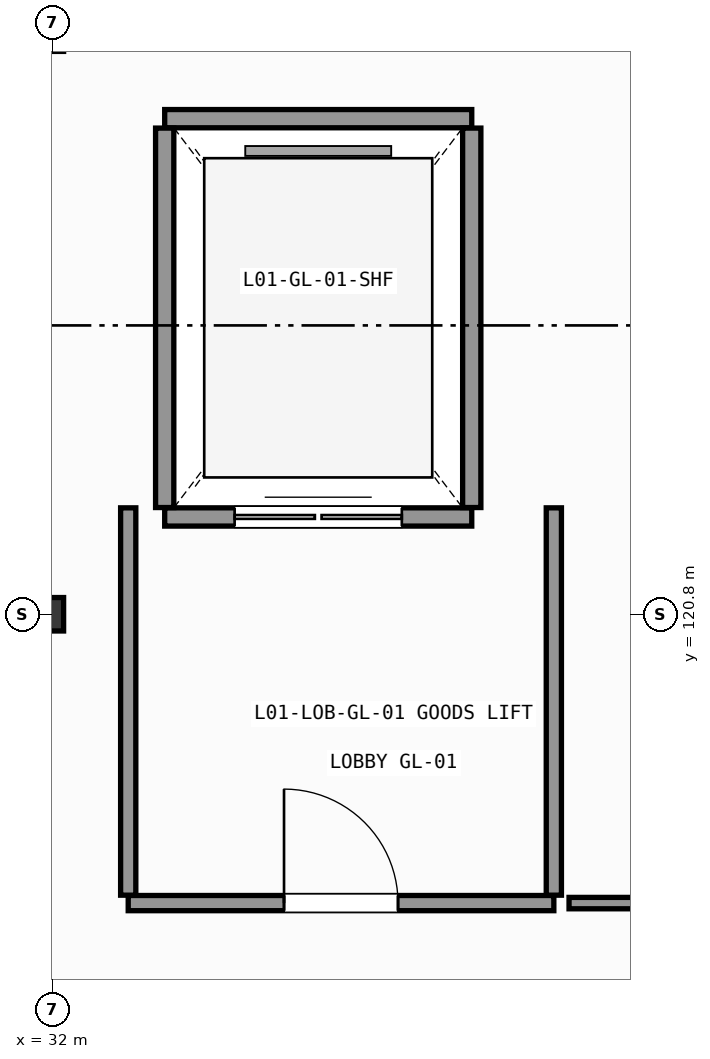
"""IFC4 building model, lengths in metres.
Left out: names, types, materials, properties, quantities, classifications, styles, units other than length and angle.
Written with IfcOpenShell. Run it as: python <this file> out.ifc"""

import sys

from ifc_helpers import new_model, si_unit, direction, frame, frame_2d, origin, origin_2d, place, context, subcontext, project, spatial, rectangle, i_section, extrude, element, fill, save


model = new_model("IFC4")
c1 = context("Model", 3, precision=1e-05, world=origin(), true_north=direction((0.0, 1.0)))
c2 = subcontext(c1, "Body", "Model", "MODEL_VIEW")
j1 = project(units=[si_unit("LENGTHUNIT", "METRE"), si_unit("PLANEANGLEUNIT", "RADIAN")], contexts=[c1])
p1 = place(None, origin())
s1 = spatial("IfcSite", under=j1, at=p1, CompositionType="ELEMENT")
p2 = place(p1, origin())
s2 = spatial("IfcBuilding", under=s1, at=p2, CompositionType="ELEMENT")
p3 = place(p2, origin())
s3 = spatial("IfcBuildingStorey", under=s2, at=p3, CompositionType="ELEMENT", Elevation=0.0)
p4 = place(p3, frame((32.0, 120.8, 0.0), z_axis=(0.0, 0.0, 1.0), x_axis=(1.0, 0.0, 0.0)))
e1 = element("IfcColumn", 1, at=p4, inside=s3, PredefinedType="COLUMN", context=c2, shape_type="SweptSolid", body=[
    extrude(i_section(OverallWidth=0.3, OverallDepth=0.44, WebThickness=0.011, FlangeThickness=0.021, FilletRadius=0.027, at=origin_2d()), origin(), (0.0, 0.0, 1.0), 7.8),
])
p5 = place(p3, frame((33.48, 122.08, 0.0), z_axis=(0.0, 0.0, 1.0), x_axis=(1.0, 0.0, 0.0)))
e2 = element("IfcWall", 2, at=p5, inside=s3, PredefinedType="SHEAR", context=c2, shape_type="SweptSolid", body=[
    extrude(rectangle(XDim=4.04, YDim=0.24, at=frame_2d((2.02, 0.0))), origin(), (0.0, 0.0, 1.0), 7.54),
])
p6 = place(p5, frame((0.92, 0.0, 0.0)))
e3 = element("IfcOpeningElement", 3, at=p6, cuts=e2, PredefinedType="OPENING", context=c2, shape_type="SweptSolid", body=[
    extrude(rectangle(XDim=2.2, YDim=2.6, at=frame_2d((1.1, 1.3))), frame((0.0, 0.13, 0.0), z_axis=(0.0, -1.0, 0.0), x_axis=(1.0, 0.0, 0.0)), (0.0, 0.0, 1.0), 0.26),
])
p7 = place(p3, frame((33.48, 127.32, 0.0), z_axis=(0.0, 0.0, 1.0), x_axis=(1.0, 0.0, 0.0)))
e4 = element("IfcWall", 4, at=p7, inside=s3, PredefinedType="SHEAR", context=c2, shape_type="SweptSolid", body=[
    extrude(rectangle(XDim=4.04, YDim=0.24, at=frame_2d((2.02, 0.0))), origin(), (0.0, 0.0, 1.0), 7.54),
])
for number, where, z_axis, x_axis in (
    (5, (33.48, 122.204, 0.0), (0.0, 0.0, 1.0), (0.0, 1.0, 0.0)),
    (6, (37.52, 122.204, 0.0), (0.0, 0.0, 1.0), (0.0, 1.0, 0.0)),
):
    element("IfcWall", number, at=place(p3, frame(where, z_axis=z_axis, x_axis=x_axis)), inside=s3, PredefinedType="SHEAR", context=c2, shape_type="SweptSolid", body=[
        extrude(rectangle(XDim=4.992, YDim=0.24, at=frame_2d((2.496, 0.0))), origin(), (0.0, 0.0, 1.0), 7.54),
    ])
p8 = place(p3, frame((33.0, 117.0, 0.0), z_axis=(0.0, 0.0, 1.0), x_axis=(1.0, 0.0, 0.0)))
e7 = element("IfcWall", 7, at=p8, inside=s3, PredefinedType="PARTITIONING", context=c2, shape_type="SweptSolid", body=[
    extrude(rectangle(XDim=5.6, YDim=0.2, at=frame_2d((2.8, 0.0))), origin(), (0.0, 0.0, 1.0), 7.54),
])
p9 = place(p8, frame((2.05, 0.0, 0.0)))
e8 = element("IfcOpeningElement", 8, at=p9, cuts=e7, PredefinedType="OPENING", context=c2, shape_type="SweptSolid", body=[
    extrude(rectangle(XDim=1.5, YDim=2.2, at=frame_2d((0.75, 1.1))), frame((0.0, 0.11, 0.0), z_axis=(0.0, -1.0, 0.0), x_axis=(1.0, 0.0, 0.0)), (0.0, 0.0, 1.0), 0.22),
])
for number, where, z_axis, x_axis in (
    (9, (33.0, 117.104, 0.0), (0.0, 0.0, 1.0), (0.0, 1.0, 0.0)),
    (10, (38.6, 117.104, 0.0), (0.0, 0.0, 1.0), (0.0, 1.0, 0.0)),
):
    element("IfcWall", number, at=place(p3, frame(where, z_axis=z_axis, x_axis=x_axis)), inside=s3, PredefinedType="PARTITIONING", context=c2, shape_type="SweptSolid", body=[
        extrude(rectangle(XDim=5.096, YDim=0.2, at=frame_2d((2.548, 0.0))), origin(), (0.0, 0.0, 1.0), 7.54),
    ])
p10 = place(p3, frame((38.8, 117.0, 0.0), z_axis=(0.0, 0.0, 1.0), x_axis=(1.0, 0.0, 0.0)))
e11 = element("IfcWall", 11, at=p10, inside=s3, PredefinedType="PARTITIONING", context=c2, shape_type="SweptSolid", body=[
    extrude(rectangle(XDim=9.446, YDim=0.15, at=frame_2d((4.723, 0.0))), origin(), (0.0, 0.0, 1.0), 7.54),
])
p11 = place(p10, frame((4.123, 0.0, 0.0)))
e12 = element("IfcOpeningElement", 12, at=p11, cuts=e11, PredefinedType="OPENING", context=c2, shape_type="SweptSolid", body=[
    extrude(rectangle(XDim=1.2, YDim=2.2, at=frame_2d((0.6, 1.1))), frame((0.0, 0.085, 0.0), z_axis=(0.0, -1.0, 0.0), x_axis=(1.0, 0.0, 0.0)), (0.0, 0.0, 1.0), 0.17),
])
p12 = place(p6, origin())
e13 = element("IfcDoor", 13, at=p12, inside=s3, OperationType="DOUBLE_DOOR_SLIDING", PredefinedType="DOOR", context=c2, shape_type="SweptSolid", body=[
    extrude(rectangle(XDim=2.2, YDim=2.6, at=frame_2d((1.1, 1.3))), frame((0.0, 0.025, 0.0), z_axis=(0.0, -1.0, 0.0), x_axis=(1.0, 0.0, 0.0)), (0.0, 0.0, 1.0), 0.05),
])
fill(e3, e13)
p13 = place(p9, origin())
e14 = element("IfcDoor", 14, at=p13, inside=s3, OperationType="SINGLE_SWING_LEFT", PredefinedType="DOOR", context=c2, shape_type="SweptSolid", body=[
    extrude(rectangle(XDim=1.5, YDim=2.2, at=frame_2d((0.75, 1.1))), frame((0.0, 0.025, 0.0), z_axis=(0.0, -1.0, 0.0), x_axis=(1.0, 0.0, 0.0)), (0.0, 0.0, 1.0), 0.05),
])
fill(e8, e14)
save(model, sys.argv[1])
